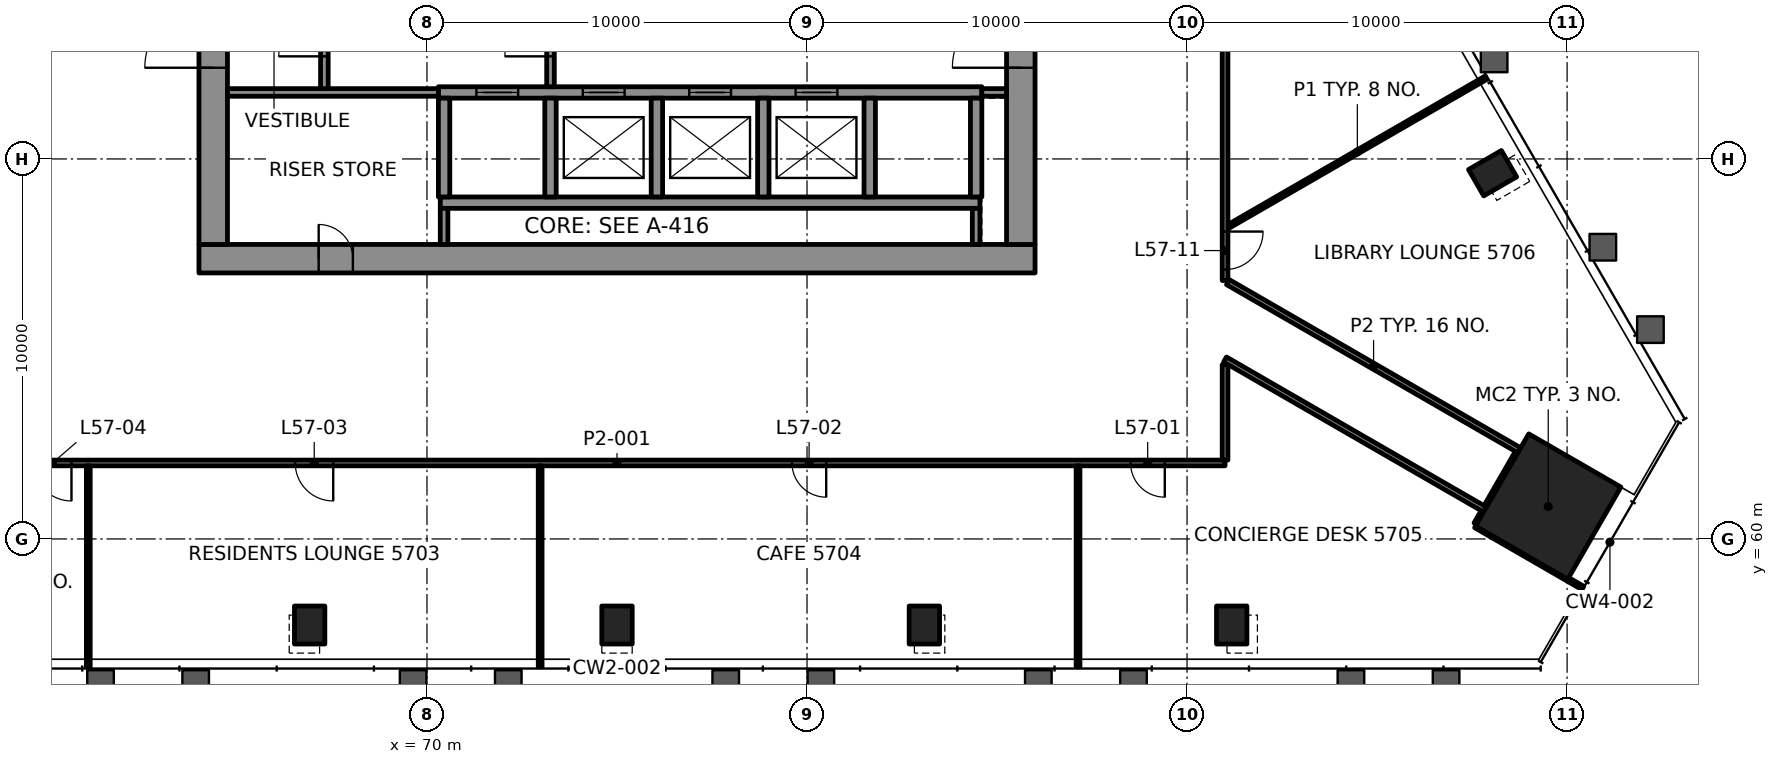
"""IFC4 building model, lengths in metres.
Left out: names, types, materials, properties, quantities, classifications, styles, units other than length and angle.
Written with IfcOpenShell. Run it as: python <this file> out.ifc"""

import sys

from ifc_helpers import new_model, si_unit, direction, frame, frame_2d, origin, origin_2d, place, context, subcontext, project, spatial, rectangle, hollow_rectangle, extrude, element, fill, save


model = new_model("IFC4")
c1 = context("Model", 3, precision=1e-05, world=origin(), true_north=direction((0.0, 1.0)))
c2 = subcontext(c1, "Body", "Model", "MODEL_VIEW")
j1 = project(units=[si_unit("LENGTHUNIT", "METRE"), si_unit("PLANEANGLEUNIT", "RADIAN")], contexts=[c1])
p1 = place(None, origin())
s1 = spatial("IfcSite", under=j1, at=p1, CompositionType="ELEMENT")
p2 = place(p1, origin())
s2 = spatial("IfcBuilding", under=s1, at=p2, CompositionType="ELEMENT")
p3 = place(p2, frame((0.0, 0.0, 241.6)))
s3 = spatial("IfcBuildingStorey", under=s2, at=p3, CompositionType="ELEMENT", Elevation=241.6)
p4 = place(p3, frame((99.504, 60.853, 0.0), z_axis=(0.0, 0.0, 1.0), x_axis=(0.5, 0.866025403784, 0.0)))
e1 = element("IfcColumn", 1, at=p4, inside=s3, PredefinedType="COLUMN", context=c2, shape_type="SweptSolid", body=[
    extrude(rectangle(XDim=2.8, YDim=2.8, at=origin_2d()), origin(), (0.0, 0.0, 1.0), 6.0),
])
for number, where, z_axis, x_axis in (
    (2, (66.913, 57.735, -0.0), (0.0, 0.0, 1.0), (1.0, 0.0, 0.0)),
    (3, (75.0, 57.735, -0.0), (0.0, 0.0, 1.0), (1.0, 0.0, 0.0)),
    (4, (83.087, 57.735, -0.0), (0.0, 0.0, 1.0), (1.0, 0.0, 0.0)),
    (5, (91.175, 57.735, -0.0), (0.0, 0.0, 1.0), (1.0, 0.0, 0.0)),
    (6, (98.039, 69.625, -0.0), (0.0, 0.0, 1.0), (-0.5, 0.866, 0.0)),
):
    element("IfcColumn", number, at=place(p3, frame(where, z_axis=z_axis, x_axis=x_axis)), inside=s3, PredefinedType="COLUMN", context=c2, shape_type="SweptSolid", body=[
        extrude(hollow_rectangle(XDim=0.8, YDim=1.0, WallThickness=0.05, at=origin_2d()), origin(), (0.0, 0.0, 1.0), 6.0),
    ])
p5 = place(p3, frame((64.0, 67.375, 0.0), z_axis=(0.0, 0.0, 1.0), x_axis=(1.0, 0.0, 0.0)))
e7 = element("IfcWall", 7, at=p5, inside=s3, PredefinedType="SHEAR", context=c2, shape_type="SweptSolid", body=[
    extrude(rectangle(XDim=22.0, YDim=0.75, at=frame_2d((11.0, 0.0))), origin(), (0.0, 0.0, 1.0), 5.55),
])
p6 = place(p5, frame((3.15, 0.0, 0.0)))
e8 = element("IfcOpeningElement", 8, at=p6, cuts=e7, PredefinedType="OPENING", context=c2, shape_type="SweptSolid", body=[
    extrude(rectangle(XDim=0.9, YDim=2.1, at=frame_2d((0.45, 1.05))), frame((0.0, 0.385, 0.0), z_axis=(0.0, -1.0, 0.0), x_axis=(1.0, 0.0, 0.0)), (0.0, 0.0, 1.0), 0.77),
])
p7 = place(p3, frame((64.375, 67.75, 0.0), z_axis=(0.0, 0.0, 1.0), x_axis=(0.0, 1.0, 0.0)))
e9 = element("IfcWall", 9, at=p7, inside=s3, PredefinedType="SHEAR", context=c2, shape_type="SweptSolid", body=[
    extrude(rectangle(XDim=14.5, YDim=0.75, at=frame_2d((7.25, 0.0))), origin(), (0.0, 0.0, 1.0), 5.55),
])
p8 = place(p7, frame((4.65, 0.0, 0.0)))
e10 = element("IfcOpeningElement", 10, at=p8, cuts=e9, PredefinedType="OPENING", context=c2, shape_type="SweptSolid", body=[
    extrude(rectangle(XDim=1.8, YDim=2.1, at=frame_2d((0.9, 1.05))), frame((0.0, 0.385, 0.0), z_axis=(0.0, -1.0, 0.0), x_axis=(1.0, 0.0, 0.0)), (0.0, 0.0, 1.0), 0.77),
])
p9 = place(p7, frame((8.5, 0.0, 0.0)))
e11 = element("IfcOpeningElement", 11, at=p9, cuts=e9, PredefinedType="OPENING", context=c2, shape_type="SweptSolid", body=[
    extrude(rectangle(XDim=0.9, YDim=2.1, at=frame_2d((0.45, 1.05))), frame((0.0, 0.385, 0.0), z_axis=(0.0, -1.0, 0.0), x_axis=(1.0, 0.0, 0.0)), (0.0, 0.0, 1.0), 0.77),
])
p10 = place(p7, frame((12.2, 0.0, 0.0)))
e12 = element("IfcOpeningElement", 12, at=p10, cuts=e9, PredefinedType="OPENING", context=c2, shape_type="SweptSolid", body=[
    extrude(rectangle(XDim=0.9, YDim=2.1, at=frame_2d((0.45, 1.05))), frame((0.0, 0.385, 0.0), z_axis=(0.0, -1.0, 0.0), x_axis=(1.0, 0.0, 0.0)), (0.0, 0.0, 1.0), 0.77),
])
p11 = place(p3, frame((85.625, 67.75, 0.0), z_axis=(0.0, 0.0, 1.0), x_axis=(0.0, 1.0, 0.0)))
e13 = element("IfcWall", 13, at=p11, inside=s3, PredefinedType="SHEAR", context=c2, shape_type="SweptSolid", body=[
    extrude(rectangle(XDim=14.5, YDim=0.75, at=frame_2d((7.25, 0.0))), origin(), (0.0, 0.0, 1.0), 5.55),
])
p12 = place(p11, frame((4.65, 0.0, 0.0)))
e14 = element("IfcOpeningElement", 14, at=p12, cuts=e13, PredefinedType="OPENING", context=c2, shape_type="SweptSolid", body=[
    extrude(rectangle(XDim=1.8, YDim=2.1, at=frame_2d((0.9, 1.05))), frame((0.0, 0.385, 0.0), z_axis=(0.0, -1.0, 0.0), x_axis=(1.0, 0.0, 0.0)), (0.0, 0.0, 1.0), 0.77),
])
p13 = place(p11, frame((11.8, 0.0, 0.0)))
e15 = element("IfcOpeningElement", 15, at=p13, cuts=e13, PredefinedType="OPENING", context=c2, shape_type="SweptSolid", body=[
    extrude(rectangle(XDim=0.9, YDim=2.1, at=frame_2d((0.45, 1.05))), frame((0.0, 0.385, 0.0), z_axis=(0.0, -1.0, 0.0), x_axis=(1.0, 0.0, 0.0)), (0.0, 0.0, 1.0), 0.77),
])
p14 = place(p3, frame((70.35, 68.85, 0.0), z_axis=(0.0, 0.0, 1.0), x_axis=(1.0, 0.0, 0.0)))
e16 = element("IfcWall", 16, at=p14, inside=s3, PredefinedType="SHEAR", context=c2, shape_type="SweptSolid", body=[
    extrude(rectangle(XDim=14.2, YDim=0.3, at=frame_2d((7.1, 0.0))), origin(), (0.0, 0.0, 1.0), 5.55),
])
p15 = place(p3, frame((70.3, 71.75, 0.0), z_axis=(0.0, 0.0, 1.0), x_axis=(1.0, 0.0, 0.0)))
e17 = element("IfcWall", 17, at=p15, inside=s3, PredefinedType="SHEAR", context=c2, shape_type="SweptSolid", body=[
    extrude(rectangle(XDim=14.3, YDim=0.3, at=frame_2d((7.15, 0.0))), origin(), (0.0, 0.0, 1.0), 5.55),
])
p16 = place(p15, frame((1.0, 0.0, 0.0)))
e18 = element("IfcOpeningElement", 18, at=p16, cuts=e17, PredefinedType="OPENING", context=c2, shape_type="SweptSolid", body=[
    extrude(rectangle(XDim=1.1, YDim=2.1, at=frame_2d((0.55, 1.05))), frame((0.0, 0.16, 0.0), z_axis=(0.0, -1.0, 0.0), x_axis=(1.0, 0.0, 0.0)), (0.0, 0.0, 1.0), 0.32),
])
p17 = place(p15, frame((3.8, 0.0, 0.0)))
e19 = element("IfcOpeningElement", 19, at=p17, cuts=e17, PredefinedType="OPENING", context=c2, shape_type="SweptSolid", body=[
    extrude(rectangle(XDim=1.1, YDim=2.1, at=frame_2d((0.55, 1.05))), frame((0.0, 0.16, 0.0), z_axis=(0.0, -1.0, 0.0), x_axis=(1.0, 0.0, 0.0)), (0.0, 0.0, 1.0), 0.32),
])
p18 = place(p15, frame((6.6, 0.0, 0.0)))
e20 = element("IfcOpeningElement", 20, at=p18, cuts=e17, PredefinedType="OPENING", context=c2, shape_type="SweptSolid", body=[
    extrude(rectangle(XDim=1.1, YDim=2.1, at=frame_2d((0.55, 1.05))), frame((0.0, 0.16, 0.0), z_axis=(0.0, -1.0, 0.0), x_axis=(1.0, 0.0, 0.0)), (0.0, 0.0, 1.0), 0.32),
])
p19 = place(p15, frame((9.4, 0.0, 0.0)))
e21 = element("IfcOpeningElement", 21, at=p19, cuts=e17, PredefinedType="OPENING", context=c2, shape_type="SweptSolid", body=[
    extrude(rectangle(XDim=1.1, YDim=2.1, at=frame_2d((0.55, 1.05))), frame((0.0, 0.16, 0.0), z_axis=(0.0, -1.0, 0.0), x_axis=(1.0, 0.0, 0.0)), (0.0, 0.0, 1.0), 0.32),
])
for number, where, z_axis, x_axis in (
    (22, (70.45, 69.0, 0.0), (0.0, 0.0, 1.0), (0.0, 1.0, 0.0)),
    (23, (73.25, 69.0, 0.0), (0.0, 0.0, 1.0), (0.0, 1.0, 0.0)),
    (24, (76.05, 69.0, 0.0), (0.0, 0.0, 1.0), (0.0, 1.0, 0.0)),
    (25, (78.85, 69.0, 0.0), (0.0, 0.0, 1.0), (0.0, 1.0, 0.0)),
    (26, (81.65, 69.0, 0.0), (0.0, 0.0, 1.0), (0.0, 1.0, 0.0)),
    (27, (84.45, 69.0, 0.0), (0.0, 0.0, 1.0), (0.0, 1.0, 0.0)),
):
    element("IfcWall", number, at=place(p3, frame(where, z_axis=z_axis, x_axis=x_axis)), inside=s3, PredefinedType="SHEAR", context=c2, shape_type="SweptSolid", body=[
        extrude(rectangle(XDim=2.6, YDim=0.3, at=frame_2d((1.3, 0.0))), origin(), (0.0, 0.0, 1.0), 5.55),
    ])
p20 = place(p3, frame((91.0, 62.0, 0.0), z_axis=(0.0, 0.0, 1.0), x_axis=(-1.0, 0.0, 0.0)))
e28 = element("IfcWall", 28, at=p20, inside=s3, PredefinedType="PARTITIONING", context=c2, shape_type="SweptSolid", body=[
    extrude(rectangle(XDim=31.999, YDim=0.15, at=frame_2d((16.0, 0.0))), origin(), (0.0, 0.0, 1.0), 4.95),
])
p21 = place(p20, frame((1.586, 0.0, 0.0)))
e29 = element("IfcOpeningElement", 29, at=p21, cuts=e28, PredefinedType="OPENING", context=c2, shape_type="SweptSolid", body=[
    extrude(rectangle(XDim=0.9, YDim=2.1, at=frame_2d((0.45, 1.05))), frame((0.0, 0.085, 0.0), z_axis=(0.0, -1.0, 0.0), x_axis=(1.0, 0.0, 0.0)), (0.0, 0.0, 1.0), 0.17),
])
p22 = place(p20, frame((10.495, 0.0, 0.0)))
e30 = element("IfcOpeningElement", 30, at=p22, cuts=e28, PredefinedType="OPENING", context=c2, shape_type="SweptSolid", body=[
    extrude(rectangle(XDim=0.9, YDim=2.1, at=frame_2d((0.45, 1.05))), frame((0.0, 0.085, 0.0), z_axis=(0.0, -1.0, 0.0), x_axis=(1.0, 0.0, 0.0)), (0.0, 0.0, 1.0), 0.17),
])
p23 = place(p20, frame((23.467, 0.0, 0.0)))
e31 = element("IfcOpeningElement", 31, at=p23, cuts=e28, PredefinedType="OPENING", context=c2, shape_type="SweptSolid", body=[
    extrude(rectangle(XDim=1.0, YDim=2.1, at=frame_2d((0.5, 1.05))), frame((0.0, 0.085, 0.0), z_axis=(0.0, -1.0, 0.0), x_axis=(1.0, 0.0, 0.0)), (0.0, 0.0, 1.0), 0.17),
])
p24 = place(p20, frame((30.354, 0.0, 0.0)))
e32 = element("IfcOpeningElement", 32, at=p24, cuts=e28, PredefinedType="OPENING", context=c2, shape_type="SweptSolid", body=[
    extrude(rectangle(XDim=1.0, YDim=2.1, at=frame_2d((0.5, 1.05))), frame((0.0, 0.085, 0.0), z_axis=(0.0, -1.0, 0.0), x_axis=(1.0, 0.0, 0.0)), (0.0, 0.0, 1.0), 0.17),
])
p25 = place(p3, frame((91.101, 68.232, 0.0), z_axis=(0.0, 0.0, 1.0), x_axis=(0.866026716264, 0.499997726712, 0.0)))
e33 = element("IfcWall", 33, at=p25, inside=s3, PredefinedType="PARTITIONING", context=c2, shape_type="SweptSolid", body=[
    extrude(rectangle(XDim=7.805, YDim=0.1, at=frame_2d((3.903, 0.0))), origin(), (0.0, 0.0, 1.0), 4.872),
])
p26 = place(p3, frame((97.616, 60.384, 0.0), z_axis=(0.0, 0.0, 1.0), x_axis=(0.499854089722, 0.866109628736, 0.0)))
e34 = element("IfcWall", 34, at=p26, inside=s3, PredefinedType="PARTITIONING", context=c2, shape_type="SweptSolid", body=[
    extrude(rectangle(XDim=0.375, YDim=0.15, at=frame_2d((0.187, 0.0))), origin(), (0.0, 0.0, 1.0), 4.95),
])
p27 = place(p3, frame((91.0, 62.075, 0.0), z_axis=(0.0, 0.0, 1.0), x_axis=(0.0, 1.0, 0.0)))
e35 = element("IfcWall", 35, at=p27, inside=s3, PredefinedType="PARTITIONING", context=c2, shape_type="SweptSolid", body=[
    extrude(rectangle(XDim=2.511, YDim=0.15, at=frame_2d((1.255, 0.0))), origin(), (0.0, 0.0, 1.0), 4.797),
])
p28 = place(p3, frame((91.0, 84.017, 0.0), z_axis=(0.0, 0.0, 1.0), x_axis=(0.0, -1.0, 0.0)))
e36 = element("IfcWall", 36, at=p28, inside=s3, PredefinedType="PARTITIONING", context=c2, shape_type="SweptSolid", body=[
    extrude(rectangle(XDim=17.215, YDim=0.15, at=frame_2d((8.607, 0.0))), origin(), (0.0, 0.0, 1.0), 4.872),
])
p29 = place(p28, frame((8.024, 0.0, 0.0)))
e37 = element("IfcOpeningElement", 37, at=p29, cuts=e36, PredefinedType="OPENING", context=c2, shape_type="SweptSolid", body=[
    extrude(rectangle(XDim=1.0, YDim=2.1, at=frame_2d((0.5, 1.05))), frame((0.0, 0.085, 0.0), z_axis=(0.0, -1.0, 0.0), x_axis=(1.0, 0.0, 0.0)), (0.0, 0.0, 1.0), 0.17),
])
p30 = place(p28, frame((15.928, 0.0, 0.0)))
e38 = element("IfcOpeningElement", 38, at=p30, cuts=e36, PredefinedType="OPENING", context=c2, shape_type="SweptSolid", body=[
    extrude(rectangle(XDim=1.0, YDim=2.1, at=frame_2d((0.5, 1.05))), frame((0.0, 0.085, 0.0), z_axis=(0.0, -1.0, 0.0), x_axis=(1.0, 0.0, 0.0)), (0.0, 0.0, 1.0), 0.17),
])
for number, where, z_axis, x_axis in (
    (39, (87.131, 56.635, 0.0), (0.0, 0.0, 1.0), (0.0, 1.0, 0.0)),
    (40, (72.978, 56.635, 0.0), (0.0, 0.0, 1.0), (0.0, 1.0, 0.0)),
    (41, (61.088, 56.635, 0.0), (0.0, 0.0, 1.0), (0.0, 1.0, 0.0)),
):
    element("IfcWall", number, at=place(p3, frame(where, z_axis=z_axis, x_axis=x_axis)), inside=s3, PredefinedType="PARTITIONING", context=c2, shape_type="SweptSolid", body=[
        extrude(rectangle(XDim=5.29, YDim=0.1, at=frame_2d((2.645, 0.0))), origin(), (0.0, 0.0, 1.0), 4.872),
    ])
p31 = place(p3, frame((98.741, 62.333, 0.0), z_axis=(0.0, 0.0, 1.0), x_axis=(-0.866028044417, 0.499995426262, 0.0)))
e42 = element("IfcWall", 42, at=p31, inside=s3, PredefinedType="PARTITIONING", context=c2, shape_type="SweptSolid", body=[
    extrude(rectangle(XDim=8.852, YDim=0.15, at=frame_2d((4.426, 0.0))), origin(), (0.0, 0.0, 1.0), 4.95),
])
p32 = place(p3, frame((97.841, 60.774, 0.0), z_axis=(0.0, 0.0, 1.0), x_axis=(-0.866030148722, 0.499991781437, 0.0)))
e43 = element("IfcWall", 43, at=p32, inside=s3, PredefinedType="PARTITIONING", context=c2, shape_type="SweptSolid", body=[
    extrude(rectangle(XDim=7.899, YDim=0.15, at=frame_2d((3.95, 0.0))), origin(), (0.0, 0.0, 1.0), 4.797),
])
p33 = place(p3, frame((100.414, 58.71, 0.0), z_axis=(0.0, 0.0, 1.0), x_axis=(-0.866003472149, 0.500037984783, 0.0)))
e44 = element("IfcWall", 44, at=p33, inside=s3, PredefinedType="PARTITIONING", context=c2, shape_type="SweptSolid", body=[
    extrude(rectangle(XDim=3.26, YDim=0.1, at=frame_2d((1.63, 0.0))), origin(), (0.0, 0.0, 1.0), 4.95),
])
p34 = place(p3, frame((97.878, 60.839, 0.0), z_axis=(0.0, 0.0, 1.0), x_axis=(0.499991515992, 0.866030301974, 0.0)))
e45 = element("IfcWall", 45, at=p34, inside=s3, PredefinedType="PARTITIONING", context=c2, shape_type="SweptSolid", body=[
    extrude(rectangle(XDim=1.649, YDim=0.15, at=frame_2d((0.825, 0.0))), origin(), (0.0, 0.0, 1.0), 4.797),
])
p35 = place(p3, frame((64.75, 71.75, 0.0), z_axis=(0.0, 0.0, 1.0), x_axis=(1.0, 0.0, 0.0)))
e46 = element("IfcWall", 46, at=p35, inside=s3, PredefinedType="PARTITIONING", context=c2, shape_type="SweptSolid", body=[
    extrude(rectangle(XDim=5.55, YDim=0.2, at=frame_2d((2.775, 0.0))), origin(), (0.0, 0.0, 1.0), 5.55),
])
p36 = place(p3, frame((84.6, 71.75, 0.0), z_axis=(0.0, 0.0, 1.0), x_axis=(1.0, 0.0, 0.0)))
e47 = element("IfcWall", 47, at=p36, inside=s3, PredefinedType="PARTITIONING", context=c2, shape_type="SweptSolid", body=[
    extrude(rectangle(XDim=0.65, YDim=0.2, at=frame_2d((0.325, 0.0))), origin(), (0.0, 0.0, 1.0), 5.55),
])
p37 = place(p3, frame((67.3, 71.85, 0.0), z_axis=(0.0, 0.0, 1.0), x_axis=(0.0, 1.0, 0.0)))
e48 = element("IfcWall", 48, at=p37, inside=s3, PredefinedType="PARTITIONING", context=c2, shape_type="SweptSolid", body=[
    extrude(rectangle(XDim=5.75, YDim=0.2, at=frame_2d((2.875, 0.0))), origin(), (0.0, 0.0, 1.0), 5.55),
])
p38 = place(p37, frame((0.85, 0.0, 0.0)))
e49 = element("IfcOpeningElement", 49, at=p38, cuts=e48, PredefinedType="OPENING", context=c2, shape_type="SweptSolid", body=[
    extrude(rectangle(XDim=1.2, YDim=2.1, at=frame_2d((0.6, 1.05))), frame((0.0, 0.11, 0.0), z_axis=(0.0, -1.0, 0.0), x_axis=(1.0, 0.0, 0.0)), (0.0, 0.0, 1.0), 0.22),
])
p39 = place(p3, frame((70.45, 67.75, 0.0), z_axis=(0.0, 0.0, 1.0), x_axis=(0.0, 1.0, 0.0)))
e50 = element("IfcWall", 50, at=p39, inside=s3, PredefinedType="PARTITIONING", context=c2, shape_type="SweptSolid", body=[
    extrude(rectangle(XDim=0.95, YDim=0.2, at=frame_2d((0.475, 0.0))), origin(), (0.0, 0.0, 1.0), 5.55),
])
p40 = place(p3, frame((73.25, 71.9, 0.0), z_axis=(0.0, 0.0, 1.0), x_axis=(0.0, 1.0, 0.0)))
e51 = element("IfcWall", 51, at=p40, inside=s3, PredefinedType="PARTITIONING", context=c2, shape_type="SweptSolid", body=[
    extrude(rectangle(XDim=2.8, YDim=0.2, at=frame_2d((1.4, 0.0))), origin(), (0.0, 0.0, 1.0), 5.55),
])
p41 = place(p40, frame((0.8, 0.0, 0.0)))
e52 = element("IfcOpeningElement", 52, at=p41, cuts=e51, PredefinedType="OPENING", context=c2, shape_type="SweptSolid", body=[
    extrude(rectangle(XDim=1.2, YDim=2.1, at=frame_2d((0.6, 1.05))), frame((0.0, 0.11, 0.0), z_axis=(0.0, -1.0, 0.0), x_axis=(1.0, 0.0, 0.0)), (0.0, 0.0, 1.0), 0.22),
])
p42 = place(p3, frame((84.45, 67.75, 0.0), z_axis=(0.0, 0.0, 1.0), x_axis=(0.0, 1.0, 0.0)))
e53 = element("IfcWall", 53, at=p42, inside=s3, PredefinedType="PARTITIONING", context=c2, shape_type="SweptSolid", body=[
    extrude(rectangle(XDim=0.95, YDim=0.2, at=frame_2d((0.475, 0.0))), origin(), (0.0, 0.0, 1.0), 5.55),
])
p43 = place(p21, origin())
e54 = element("IfcDoor", 54, at=p43, inside=s3, OperationType="SINGLE_SWING_LEFT", PredefinedType="DOOR", context=c2, shape_type="SweptSolid", body=[
    extrude(rectangle(XDim=0.9, YDim=2.1, at=frame_2d((0.45, 1.05))), frame((0.0, 0.025, 0.0), z_axis=(0.0, -1.0, 0.0), x_axis=(1.0, 0.0, 0.0)), (0.0, 0.0, 1.0), 0.05),
])
fill(e29, e54)
p44 = place(p22, origin())
e55 = element("IfcDoor", 55, at=p44, inside=s3, OperationType="SINGLE_SWING_RIGHT", PredefinedType="DOOR", context=c2, shape_type="SweptSolid", body=[
    extrude(rectangle(XDim=0.9, YDim=2.1, at=frame_2d((0.45, 1.05))), frame((0.0, 0.025, 0.0), z_axis=(0.0, -1.0, 0.0), x_axis=(1.0, 0.0, 0.0)), (0.0, 0.0, 1.0), 0.05),
])
fill(e30, e55)
p45 = place(p23, origin())
e56 = element("IfcDoor", 56, at=p45, inside=s3, OperationType="SINGLE_SWING_LEFT", PredefinedType="DOOR", context=c2, shape_type="SweptSolid", body=[
    extrude(rectangle(XDim=1.0, YDim=2.1, at=frame_2d((0.5, 1.05))), frame((0.0, 0.025, 0.0), z_axis=(0.0, -1.0, 0.0), x_axis=(1.0, 0.0, 0.0)), (0.0, 0.0, 1.0), 0.05),
])
fill(e31, e56)
p46 = place(p24, origin())
e57 = element("IfcDoor", 57, at=p46, inside=s3, OperationType="SINGLE_SWING_RIGHT", PredefinedType="DOOR", context=c2, shape_type="SweptSolid", body=[
    extrude(rectangle(XDim=1.0, YDim=2.1, at=frame_2d((0.5, 1.05))), frame((0.0, 0.025, 0.0), z_axis=(0.0, -1.0, 0.0), x_axis=(1.0, 0.0, 0.0)), (0.0, 0.0, 1.0), 0.05),
])
fill(e32, e57)
p47 = place(p30, origin())
e58 = element("IfcDoor", 58, at=p47, inside=s3, OperationType="SINGLE_SWING_RIGHT", PredefinedType="DOOR", context=c2, shape_type="SweptSolid", body=[
    extrude(rectangle(XDim=1.0, YDim=2.1, at=frame_2d((0.5, 1.05))), frame((0.0, 0.025, 0.0), z_axis=(0.0, -1.0, 0.0), x_axis=(1.0, 0.0, 0.0)), (0.0, 0.0, 1.0), 0.05),
])
fill(e38, e58)
p48 = place(p16, origin())
e59 = element("IfcDoor", 59, at=p48, inside=s3, OperationType="DOUBLE_DOOR_SLIDING", PredefinedType="DOOR", context=c2, shape_type="SweptSolid", body=[
    extrude(rectangle(XDim=1.1, YDim=2.1, at=frame_2d((0.55, 1.05))), frame((0.0, 0.025, 0.0), z_axis=(0.0, -1.0, 0.0), x_axis=(1.0, 0.0, 0.0)), (0.0, 0.0, 1.0), 0.05),
])
fill(e18, e59)
p49 = place(p17, origin())
e60 = element("IfcDoor", 60, at=p49, inside=s3, OperationType="DOUBLE_DOOR_SLIDING", PredefinedType="DOOR", context=c2, shape_type="SweptSolid", body=[
    extrude(rectangle(XDim=1.1, YDim=2.1, at=frame_2d((0.55, 1.05))), frame((0.0, 0.025, 0.0), z_axis=(0.0, -1.0, 0.0), x_axis=(1.0, 0.0, 0.0)), (0.0, 0.0, 1.0), 0.05),
])
fill(e19, e60)
p50 = place(p18, origin())
e61 = element("IfcDoor", 61, at=p50, inside=s3, OperationType="DOUBLE_DOOR_SLIDING", PredefinedType="DOOR", context=c2, shape_type="SweptSolid", body=[
    extrude(rectangle(XDim=1.1, YDim=2.1, at=frame_2d((0.55, 1.05))), frame((0.0, 0.025, 0.0), z_axis=(0.0, -1.0, 0.0), x_axis=(1.0, 0.0, 0.0)), (0.0, 0.0, 1.0), 0.05),
])
fill(e20, e61)
p51 = place(p19, origin())
e62 = element("IfcDoor", 62, at=p51, inside=s3, OperationType="DOUBLE_DOOR_SLIDING", PredefinedType="DOOR", context=c2, shape_type="SweptSolid", body=[
    extrude(rectangle(XDim=1.1, YDim=2.1, at=frame_2d((0.55, 1.05))), frame((0.0, 0.025, 0.0), z_axis=(0.0, -1.0, 0.0), x_axis=(1.0, 0.0, 0.0)), (0.0, 0.0, 1.0), 0.05),
])
fill(e21, e62)
p52 = place(p41, origin())
e63 = element("IfcDoor", 63, at=p52, inside=s3, OperationType="SINGLE_SWING_LEFT", PredefinedType="DOOR", context=c2, shape_type="SweptSolid", body=[
    extrude(rectangle(XDim=1.2, YDim=2.1, at=frame_2d((0.6, 1.05))), frame((0.0, 0.025, 0.0), z_axis=(0.0, -1.0, 0.0), x_axis=(1.0, 0.0, 0.0)), (0.0, 0.0, 1.0), 0.05),
])
fill(e52, e63)
p53 = place(p38, origin())
e64 = element("IfcDoor", 64, at=p53, inside=s3, OperationType="SINGLE_SWING_RIGHT", PredefinedType="DOOR", context=c2, shape_type="SweptSolid", body=[
    extrude(rectangle(XDim=1.2, YDim=2.1, at=frame_2d((0.6, 1.05))), frame((0.0, 0.025, 0.0), z_axis=(0.0, -1.0, 0.0), x_axis=(1.0, 0.0, 0.0)), (0.0, 0.0, 1.0), 0.05),
])
fill(e49, e64)
p54 = place(p8, origin())
e65 = element("IfcDoor", 65, at=p54, inside=s3, OperationType="SINGLE_SWING_LEFT", PredefinedType="DOOR", context=c2, shape_type="SweptSolid", body=[
    extrude(rectangle(XDim=1.8, YDim=2.1, at=frame_2d((0.9, 1.05))), frame((0.0, 0.095, 0.0), z_axis=(0.0, -1.0, 0.0), x_axis=(1.0, 0.0, 0.0)), (0.0, 0.0, 1.0), 0.19),
])
fill(e10, e65)
p55 = place(p12, origin())
e66 = element("IfcDoor", 66, at=p55, inside=s3, OperationType="SINGLE_SWING_RIGHT", PredefinedType="DOOR", context=c2, shape_type="SweptSolid", body=[
    extrude(rectangle(XDim=1.8, YDim=2.1, at=frame_2d((0.9, 1.05))), frame((0.0, 0.095, 0.0), z_axis=(0.0, -1.0, 0.0), x_axis=(1.0, 0.0, 0.0)), (0.0, 0.0, 1.0), 0.19),
])
fill(e14, e66)
p56 = place(p6, origin())
e67 = element("IfcDoor", 67, at=p56, inside=s3, OperationType="SINGLE_SWING_LEFT", PredefinedType="DOOR", context=c2, shape_type="SweptSolid", body=[
    extrude(rectangle(XDim=0.9, YDim=2.1, at=frame_2d((0.45, 1.05))), frame((0.0, 0.095, 0.0), z_axis=(0.0, -1.0, 0.0), x_axis=(1.0, 0.0, 0.0)), (0.0, 0.0, 1.0), 0.19),
])
fill(e8, e67)
save(model, sys.argv[1])
